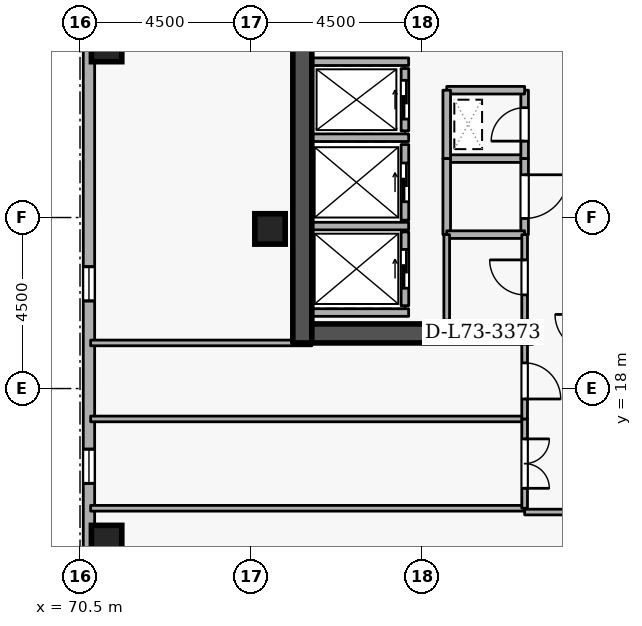
"""IFC4 building model, lengths in metres.
Left out: names, types, materials, properties, quantities, classifications, styles, units other than length and angle.
Written with IfcOpenShell. Run it as: python <this file> out.ifc"""

import sys

from ifc_helpers import new_model, si_unit, direction, frame, frame_2d, origin, origin_2d, place, context, subcontext, project, spatial, rectangle, extrude, element, fill, save


model = new_model("IFC4")
c1 = context("Model", 3, precision=1e-05, world=origin(), true_north=direction((0.0, 1.0)))
c2 = subcontext(c1, "Body", "Model", "MODEL_VIEW")
j1 = project(units=[si_unit("LENGTHUNIT", "METRE"), si_unit("PLANEANGLEUNIT", "RADIAN")], contexts=[c1])
p1 = place(None, origin())
s1 = spatial("IfcSite", under=j1, at=p1, CompositionType="ELEMENT")
p2 = place(p1, origin())
s2 = spatial("IfcBuilding", under=s1, at=p2, CompositionType="ELEMENT")
p3 = place(p2, frame((0.0, 0.0, 272.7)))
s3 = spatial("IfcBuildingStorey", under=s2, at=p3, CompositionType="ELEMENT", Elevation=272.7)
p4 = place(p3, frame((76.35, 19.2, 0.0), z_axis=(0.0, 0.0, 1.0), x_axis=(0.0, 1.0, 0.0)))
e1 = element("IfcWall", 1, at=p4, inside=s3, PredefinedType="SHEAR", context=c2, shape_type="SweptSolid", body=[
    extrude(rectangle(XDim=15.6, YDim=0.5, at=frame_2d((7.8, 0.0))), origin(), (0.0, 0.0, 1.0), 3.6),
])
p5 = place(p3, frame((76.6, 19.45, 0.0), z_axis=(0.0, 0.0, 1.0), x_axis=(1.0, 0.0, 0.0)))
e2 = element("IfcWall", 2, at=p5, inside=s3, PredefinedType="SHEAR", context=c2, shape_type="SweptSolid", body=[
    extrude(rectangle(XDim=5.8, YDim=0.5, at=frame_2d((2.9, 0.0))), origin(), (0.0, 0.0, 1.0), 3.6),
])
for number, where, z_axis, x_axis in (
    (3, (71.2, 14.0, 0.0), (0.0, 0.0, 1.0), (1.0, 0.0, 0.0)),
    (4, (71.2, 27.0, 0.0), (0.0, 0.0, 1.0), (1.0, 0.0, 0.0)),
    (5, (75.5, 22.2, 0.0), (0.0, 0.0, 1.0), (1.0, 0.0, 0.0)),
):
    element("IfcColumn", number, at=place(p3, frame(where, z_axis=z_axis, x_axis=x_axis)), inside=s3, PredefinedType="COLUMN", context=c2, shape_type="SweptSolid", body=[
        extrude(rectangle(XDim=0.8, YDim=0.8, at=origin_2d()), origin(), (0.0, 0.0, 1.0), 3.6),
    ])
p6 = place(p3, frame((70.736, 47.906, 0.0), z_axis=(0.0, 0.0, 1.0), x_axis=(-2.7061402e-05, -0.999999999634, 0.0)))
e6 = element("IfcWall", 6, at=p6, inside=s3, PredefinedType="STANDARD", context=c2, shape_type="SweptSolid", body=[
    extrude(rectangle(XDim=36.087, YDim=0.3, at=frame_2d((18.043, 0.0))), origin(), (0.0, 0.0, 1.0), 2.7),
])
p7 = place(p6, frame((2.7, 0.0, 0.72)))
e7 = element("IfcOpeningElement", 7, at=p7, cuts=e6, PredefinedType="OPENING", context=c2, shape_type="SweptSolid", body=[
    extrude(rectangle(XDim=0.9, YDim=1.75, at=frame_2d((0.45, 0.875))), frame((0.0, 0.16, 0.0), z_axis=(0.0, -1.0, 0.0), x_axis=(1.0, 0.0, 0.0)), (0.0, 0.0, 1.0), 0.32),
])
p8 = place(p6, frame((12.3, 0.0, 0.72)))
e8 = element("IfcOpeningElement", 8, at=p8, cuts=e6, PredefinedType="OPENING", context=c2, shape_type="SweptSolid", body=[
    extrude(rectangle(XDim=0.9, YDim=1.75, at=frame_2d((0.45, 0.875))), frame((0.0, 0.16, 0.0), z_axis=(0.0, -1.0, 0.0), x_axis=(1.0, 0.0, 0.0)), (0.0, 0.0, 1.0), 0.32),
])
p9 = place(p6, frame((17.1, 0.0, 0.72)))
e9 = element("IfcOpeningElement", 9, at=p9, cuts=e6, PredefinedType="OPENING", context=c2, shape_type="SweptSolid", body=[
    extrude(rectangle(XDim=0.9, YDim=1.75, at=frame_2d((0.45, 0.875))), frame((0.0, 0.16, 0.0), z_axis=(0.0, -1.0, 0.0), x_axis=(1.0, 0.0, 0.0)), (0.0, 0.0, 1.0), 0.32),
])
p10 = place(p6, frame((26.7, 0.0, 0.72)))
e10 = element("IfcOpeningElement", 10, at=p10, cuts=e6, PredefinedType="OPENING", context=c2, shape_type="SweptSolid", body=[
    extrude(rectangle(XDim=0.9, YDim=1.75, at=frame_2d((0.45, 0.875))), frame((0.0, 0.16, 0.0), z_axis=(0.0, -1.0, 0.0), x_axis=(1.0, 0.0, 0.0)), (0.0, 0.0, 1.0), 0.32),
])
p11 = place(p6, frame((31.5, 0.0, 0.72)))
e11 = element("IfcOpeningElement", 11, at=p11, cuts=e6, PredefinedType="OPENING", context=c2, shape_type="SweptSolid", body=[
    extrude(rectangle(XDim=0.9, YDim=1.75, at=frame_2d((0.45, 0.875))), frame((0.0, 0.16, 0.0), z_axis=(0.0, -1.0, 0.0), x_axis=(1.0, 0.0, 0.0)), (0.0, 0.0, 1.0), 0.32),
])
p12 = place(p3, frame((79.05, 24.78, 0.0), z_axis=(0.0, 0.0, 1.0), x_axis=(0.0, 1.0, 0.0)))
e12 = element("IfcWall", 12, at=p12, inside=s3, PredefinedType="STANDARD", context=c2, shape_type="SweptSolid", body=[
    extrude(rectangle(XDim=1.64, YDim=0.2, at=frame_2d((0.82, 0.0))), origin(), (0.0, 0.0, 1.0), 3.34),
])
p13 = place(p12, frame((0.31, 0.0, 0.0)))
e13 = element("IfcOpeningElement", 13, at=p13, cuts=e12, PredefinedType="OPENING", context=c2, shape_type="SweptSolid", body=[
    extrude(rectangle(XDim=1.02, YDim=2.06, at=frame_2d((0.51, 1.03))), frame((0.0, 0.11, 0.0), z_axis=(0.0, -1.0, 0.0), x_axis=(1.0, 0.0, 0.0)), (0.0, 0.0, 1.0), 0.22),
])
p14 = place(p3, frame((79.05, 22.43, 0.0), z_axis=(0.0, 0.0, 1.0), x_axis=(0.0, 1.0, 0.0)))
e14 = element("IfcWall", 14, at=p14, inside=s3, PredefinedType="STANDARD", context=c2, shape_type="SweptSolid", body=[
    extrude(rectangle(XDim=1.99, YDim=0.2, at=frame_2d((0.995, 0.0))), origin(), (0.0, 0.0, 1.0), 3.34),
])
p15 = place(p14, frame((0.485, 0.0, 0.0)))
e15 = element("IfcOpeningElement", 15, at=p15, cuts=e14, PredefinedType="OPENING", context=c2, shape_type="SweptSolid", body=[
    extrude(rectangle(XDim=1.02, YDim=2.06, at=frame_2d((0.51, 1.03))), frame((0.0, 0.11, 0.0), z_axis=(0.0, -1.0, 0.0), x_axis=(1.0, 0.0, 0.0)), (0.0, 0.0, 1.0), 0.22),
])
p16 = place(p3, frame((79.05, 20.18, 0.0), z_axis=(0.0, 0.0, 1.0), x_axis=(0.0, 1.0, 0.0)))
e16 = element("IfcWall", 16, at=p16, inside=s3, PredefinedType="STANDARD", context=c2, shape_type="SweptSolid", body=[
    extrude(rectangle(XDim=1.94, YDim=0.2, at=frame_2d((0.97, 0.0))), origin(), (0.0, 0.0, 1.0), 3.34),
])
p17 = place(p16, frame((0.46, 0.0, 0.0)))
e17 = element("IfcOpeningElement", 17, at=p17, cuts=e16, PredefinedType="OPENING", context=c2, shape_type="SweptSolid", body=[
    extrude(rectangle(XDim=1.02, YDim=2.06, at=frame_2d((0.51, 1.03))), frame((0.0, 0.11, 0.0), z_axis=(0.0, -1.0, 0.0), x_axis=(1.0, 0.0, 0.0)), (0.0, 0.0, 1.0), 0.22),
])
for number, where, z_axis, x_axis in (
    (18, (76.612, 26.6, 0.0), (0.0, 0.0, 1.0), (1.0, 0.0, 0.0)),
    (19, (76.612, 24.6, 0.0), (0.0, 0.0, 1.0), (1.0, 0.0, 0.0)),
    (20, (76.612, 22.275, 0.0), (0.0, 0.0, 1.0), (1.0, 0.0, 0.0)),
    (21, (76.612, 20.0, 0.0), (0.0, 0.0, 1.0), (1.0, 0.0, 0.0)),
):
    element("IfcWall", number, at=place(p3, frame(where, z_axis=z_axis, x_axis=x_axis)), inside=s3, PredefinedType="STANDARD", context=c2, shape_type="SweptSolid", body=[
        extrude(rectangle(XDim=2.536, YDim=0.2, at=frame_2d((1.268, 0.0))), origin(), (0.0, 0.0, 1.0), 3.34),
    ])
p18 = place(p3, frame((80.15, 24.05, 0.0), z_axis=(0.0, 0.0, 1.0), x_axis=(1.0, 0.0, 0.0)))
e22 = element("IfcWall", 22, at=p18, inside=s3, PredefinedType="STANDARD", context=c2, shape_type="SweptSolid", body=[
    extrude(rectangle(XDim=2.05, YDim=0.2, at=frame_2d((1.025, 0.0))), origin(), (0.0, 0.0, 1.0), 3.34),
])
p19 = place(p3, frame((82.2, 24.05, 0.0), z_axis=(0.0, 0.0, 1.0), x_axis=(0.0, 1.0, 0.0)))
e23 = element("IfcWall", 23, at=p19, inside=s3, PredefinedType="STANDARD", context=c2, shape_type="SweptSolid", body=[
    extrude(rectangle(XDim=1.8, YDim=0.2, at=frame_2d((0.9, 0.0))), origin(), (0.0, 0.0, 1.0), 3.34),
])
p20 = place(p19, frame((0.46, 0.0, 0.0)))
e24 = element("IfcOpeningElement", 24, at=p20, cuts=e23, PredefinedType="OPENING", context=c2, shape_type="SweptSolid", body=[
    extrude(rectangle(XDim=0.88, YDim=2.04, at=frame_2d((0.44, 1.02))), frame((0.0, 0.11, 0.0), z_axis=(0.0, -1.0, 0.0), x_axis=(1.0, 0.0, 0.0)), (0.0, 0.0, 1.0), 0.22),
])
p21 = place(p3, frame((82.2, 25.85, 0.0), z_axis=(0.0, 0.0, 1.0), x_axis=(-1.0, 0.0, 0.0)))
e25 = element("IfcWall", 25, at=p21, inside=s3, PredefinedType="STANDARD", context=c2, shape_type="SweptSolid", body=[
    extrude(rectangle(XDim=2.05, YDim=0.2, at=frame_2d((1.025, 0.0))), origin(), (0.0, 0.0, 1.0), 3.34),
])
p22 = place(p3, frame((80.15, 25.85, 0.0), z_axis=(0.0, 0.0, 1.0), x_axis=(0.0, -1.0, 0.0)))
e26 = element("IfcWall", 26, at=p22, inside=s3, PredefinedType="STANDARD", context=c2, shape_type="SweptSolid", body=[
    extrude(rectangle(XDim=1.8, YDim=0.2, at=frame_2d((0.9, 0.0))), origin(), (0.0, 0.0, 1.0), 3.34),
])
p23 = place(p3, frame((80.15, 22.05, 0.0), z_axis=(0.0, 0.0, 1.0), x_axis=(0.0, 1.0, 0.0)))
e27 = element("IfcWall", 27, at=p23, inside=s3, PredefinedType="STANDARD", context=c2, shape_type="SweptSolid", body=[
    extrude(rectangle(XDim=2.0, YDim=0.2, at=frame_2d((1.0, 0.0))), origin(), (0.0, 0.0, 1.0), 3.34),
])
p24 = place(p3, frame((82.2, 24.05, 0.0), z_axis=(0.0, 0.0, 1.0), x_axis=(0.0, -1.0, 0.0)))
e28 = element("IfcWall", 28, at=p24, inside=s3, PredefinedType="STANDARD", context=c2, shape_type="SweptSolid", body=[
    extrude(rectangle(XDim=2.0, YDim=0.2, at=frame_2d((1.0, 0.0))), origin(), (0.0, 0.0, 1.0), 3.34),
])
p25 = place(p24, frame((0.425, 0.0, 0.0)))
e29 = element("IfcOpeningElement", 29, at=p25, cuts=e28, PredefinedType="OPENING", context=c2, shape_type="SweptSolid", body=[
    extrude(rectangle(XDim=1.15, YDim=2.1, at=frame_2d((0.575, 1.05))), frame((0.0, 0.11, 0.0), z_axis=(0.0, -1.0, 0.0), x_axis=(1.0, 0.0, 0.0)), (0.0, 0.0, 1.0), 0.22),
])
p26 = place(p3, frame((82.2, 22.05, 0.0), z_axis=(0.0, 0.0, 1.0), x_axis=(-1.0, 0.0, 0.0)))
e30 = element("IfcWall", 30, at=p26, inside=s3, PredefinedType="STANDARD", context=c2, shape_type="SweptSolid", body=[
    extrude(rectangle(XDim=2.05, YDim=0.2, at=frame_2d((1.025, 0.0))), origin(), (0.0, 0.0, 1.0), 3.34),
])
p27 = place(p3, frame((82.2, 19.8, 0.0), z_axis=(0.0, 0.0, 1.0), x_axis=(0.0, 1.0, 0.0)))
e31 = element("IfcWall", 31, at=p27, inside=s3, PredefinedType="PARTITIONING", context=c2, shape_type="SweptSolid", body=[
    extrude(rectangle(XDim=2.25, YDim=0.15, at=frame_2d((1.125, 0.0))), origin(), (0.0, 0.0, 1.0), 3.34),
])
p28 = place(p27, frame((0.665, 0.0, 0.0)))
e32 = element("IfcOpeningElement", 32, at=p28, cuts=e31, PredefinedType="OPENING", context=c2, shape_type="SweptSolid", body=[
    extrude(rectangle(XDim=0.92, YDim=2.08, at=frame_2d((0.46, 1.04))), frame((0.0, 0.085, 0.0), z_axis=(0.0, -1.0, 0.0), x_axis=(1.0, 0.0, 0.0)), (0.0, 0.0, 1.0), 0.17),
])
p29 = place(p3, frame((80.15, 22.05, 0.0), z_axis=(0.0, 0.0, 1.0), x_axis=(0.0, -1.0, 0.0)))
e33 = element("IfcWall", 33, at=p29, inside=s3, PredefinedType="PARTITIONING", context=c2, shape_type="SweptSolid", body=[
    extrude(rectangle(XDim=2.25, YDim=0.15, at=frame_2d((1.125, 0.0))), origin(), (0.0, 0.0, 1.0), 3.34),
])
for number, where, z_axis, x_axis in (
    (34, (82.2, 14.85, 0.0), (0.0, 0.0, 1.0), (-1.0, 0.0, 0.0)),
    (35, (70.78, 17.2, 0.0), (0.0, 0.0, 1.0), (1.0, 0.0, 0.0)),
):
    element("IfcWall", number, at=place(p3, frame(where, z_axis=z_axis, x_axis=x_axis)), inside=s3, PredefinedType="PARTITIONING", context=c2, shape_type="SweptSolid", body=[
        extrude(rectangle(XDim=11.42, YDim=0.15, at=frame_2d((5.71, 0.0))), origin(), (0.0, 0.0, 1.0), 3.34),
    ])
p30 = place(p3, frame((82.2, 17.2, 0.0), z_axis=(0.0, 0.0, 1.0), x_axis=(0.0, -1.0, 0.0)))
e36 = element("IfcWall", 36, at=p30, inside=s3, PredefinedType="PARTITIONING", context=c2, shape_type="SweptSolid", body=[
    extrude(rectangle(XDim=2.35, YDim=0.15, at=frame_2d((1.175, 0.0))), origin(), (0.0, 0.0, 1.0), 3.34),
])
p31 = place(p30, frame((0.525, 0.0, 0.0)))
e37 = element("IfcOpeningElement", 37, at=p31, cuts=e36, PredefinedType="OPENING", context=c2, shape_type="SweptSolid", body=[
    extrude(rectangle(XDim=1.3, YDim=2.12, at=frame_2d((0.65, 1.06))), frame((0.0, 0.085, 0.0), z_axis=(0.0, -1.0, 0.0), x_axis=(1.0, 0.0, 0.0)), (0.0, 0.0, 1.0), 0.17),
])
p32 = place(p3, frame((70.78, 19.2, 0.0), z_axis=(0.0, 0.0, 1.0), x_axis=(1.0, 0.0, 0.0)))
e38 = element("IfcWall", 38, at=p32, inside=s3, PredefinedType="PARTITIONING", context=c2, shape_type="SweptSolid", body=[
    extrude(rectangle(XDim=5.82, YDim=0.15, at=frame_2d((2.91, 0.0))), origin(), (0.0, 0.0, 1.0), 2.545),
])
p33 = place(p3, frame((82.2, 19.2, 0.0), z_axis=(0.0, 0.0, 1.0), x_axis=(0.0, -1.0, 0.0)))
e39 = element("IfcWall", 39, at=p33, inside=s3, PredefinedType="PARTITIONING", context=c2, shape_type="SweptSolid", body=[
    extrude(rectangle(XDim=2.0, YDim=0.15, at=frame_2d((1.0, 0.0))), origin(), (0.0, 0.0, 1.0), 3.34),
])
p34 = place(p33, frame((0.525, 0.0, 0.0)))
e40 = element("IfcOpeningElement", 40, at=p34, cuts=e39, PredefinedType="OPENING", context=c2, shape_type="SweptSolid", body=[
    extrude(rectangle(XDim=0.95, YDim=2.1, at=frame_2d((0.475, 1.05))), frame((0.0, 0.085, 0.0), z_axis=(0.0, -1.0, 0.0), x_axis=(1.0, 0.0, 0.0)), (0.0, 0.0, 1.0), 0.17),
])
p35 = place(p3, frame((82.2, 14.75, 0.0), z_axis=(0.0, 0.0, 1.0), x_axis=(1.0, 0.0, 0.0)))
e41 = element("IfcWall", 41, at=p35, inside=s3, PredefinedType="PARTITIONING", context=c2, shape_type="SweptSolid", body=[
    extrude(rectangle(XDim=1.75, YDim=0.15, at=frame_2d((0.875, 0.0))), origin(), (0.0, 0.0, 1.0), 3.34),
])
p36 = place(p10, origin())
e42 = element("IfcWindow", 42, at=p36, inside=s3, PartitioningType="SINGLE_PANEL", PredefinedType="WINDOW", context=c2, shape_type="SweptSolid", body=[
    extrude(rectangle(XDim=0.9, YDim=1.75, at=frame_2d((0.45, 0.875))), frame((0.0, 0.03, 0.0), z_axis=(0.0, -1.0, 0.0), x_axis=(1.0, 0.0, 0.0)), (0.0, 0.0, 1.0), 0.06),
])
fill(e10, e42)
p37 = place(p11, origin())
e43 = element("IfcWindow", 43, at=p37, inside=s3, PartitioningType="SINGLE_PANEL", PredefinedType="WINDOW", context=c2, shape_type="SweptSolid", body=[
    extrude(rectangle(XDim=0.9, YDim=1.75, at=frame_2d((0.45, 0.875))), frame((0.0, 0.03, 0.0), z_axis=(0.0, -1.0, 0.0), x_axis=(1.0, 0.0, 0.0)), (0.0, 0.0, 1.0), 0.06),
])
fill(e11, e43)
p38 = place(p13, origin())
e44 = element("IfcDoor", 44, at=p38, inside=s3, OperationType="SLIDING_TO_LEFT", PredefinedType="DOOR", context=c2, shape_type="SweptSolid", body=[
    extrude(rectangle(XDim=1.02, YDim=2.06, at=frame_2d((0.51, 1.03))), frame((0.0, 0.025, 0.0), z_axis=(0.0, -1.0, 0.0), x_axis=(1.0, 0.0, 0.0)), (0.0, 0.0, 1.0), 0.05),
])
fill(e13, e44)
p39 = place(p15, origin())
e45 = element("IfcDoor", 45, at=p39, inside=s3, OperationType="SLIDING_TO_LEFT", PredefinedType="DOOR", context=c2, shape_type="SweptSolid", body=[
    extrude(rectangle(XDim=1.02, YDim=2.06, at=frame_2d((0.51, 1.03))), frame((0.0, 0.025, 0.0), z_axis=(0.0, -1.0, 0.0), x_axis=(1.0, 0.0, 0.0)), (0.0, 0.0, 1.0), 0.05),
])
fill(e15, e45)
p40 = place(p17, origin())
e46 = element("IfcDoor", 46, at=p40, inside=s3, OperationType="SLIDING_TO_LEFT", PredefinedType="DOOR", context=c2, shape_type="SweptSolid", body=[
    extrude(rectangle(XDim=1.02, YDim=2.06, at=frame_2d((0.51, 1.03))), frame((0.0, 0.025, 0.0), z_axis=(0.0, -1.0, 0.0), x_axis=(1.0, 0.0, 0.0)), (0.0, 0.0, 1.0), 0.05),
])
fill(e17, e46)
p41 = place(p20, origin())
e47 = element("IfcDoor", 47, at=p41, inside=s3, OperationType="SINGLE_SWING_LEFT", PredefinedType="DOOR", context=c2, shape_type="SweptSolid", body=[
    extrude(rectangle(XDim=0.88, YDim=2.04, at=frame_2d((0.44, 1.02))), frame((0.0, 0.025, 0.0), z_axis=(0.0, -1.0, 0.0), x_axis=(1.0, 0.0, 0.0)), (0.0, 0.0, 1.0), 0.05),
])
fill(e24, e47)
p42 = place(p28, origin())
e48 = element("IfcDoor", 48, at=p42, inside=s3, OperationType="SINGLE_SWING_RIGHT", PredefinedType="DOOR", context=c2, shape_type="SweptSolid", body=[
    extrude(rectangle(XDim=0.92, YDim=2.08, at=frame_2d((0.46, 1.04))), frame((0.0, 0.025, 0.0), z_axis=(0.0, -1.0, 0.0), x_axis=(1.0, 0.0, 0.0)), (0.0, 0.0, 1.0), 0.05),
])
fill(e32, e48)
p43 = place(p25, origin())
e49 = element("IfcDoor", 49, at=p43, inside=s3, OperationType="SINGLE_SWING_LEFT", PredefinedType="DOOR", context=c2, shape_type="SweptSolid", body=[
    extrude(rectangle(XDim=1.15, YDim=2.1, at=frame_2d((0.575, 1.05))), frame((0.0, 0.025, 0.0), z_axis=(0.0, -1.0, 0.0), x_axis=(1.0, 0.0, 0.0)), (0.0, 0.0, 1.0), 0.05),
])
fill(e29, e49)
p44 = place(p31, origin())
e50 = element("IfcDoor", 50, at=p44, inside=s3, OperationType="DOUBLE_DOOR_SINGLE_SWING", PredefinedType="DOOR", context=c2, shape_type="SweptSolid", body=[
    extrude(rectangle(XDim=1.3, YDim=2.12, at=frame_2d((0.65, 1.06))), frame((0.0, 0.025, 0.0), z_axis=(0.0, -1.0, 0.0), x_axis=(1.0, 0.0, 0.0)), (0.0, 0.0, 1.0), 0.05),
])
fill(e37, e50)
p45 = place(p34, origin())
e51 = element("IfcDoor", 51, at=p45, inside=s3, OperationType="SINGLE_SWING_RIGHT", PredefinedType="DOOR", context=c2, shape_type="SweptSolid", body=[
    extrude(rectangle(XDim=0.95, YDim=2.1, at=frame_2d((0.475, 1.05))), frame((0.0, 0.025, 0.0), z_axis=(0.0, -1.0, 0.0), x_axis=(1.0, 0.0, 0.0)), (0.0, 0.0, 1.0), 0.05),
])
fill(e40, e51)
save(model, sys.argv[1])
